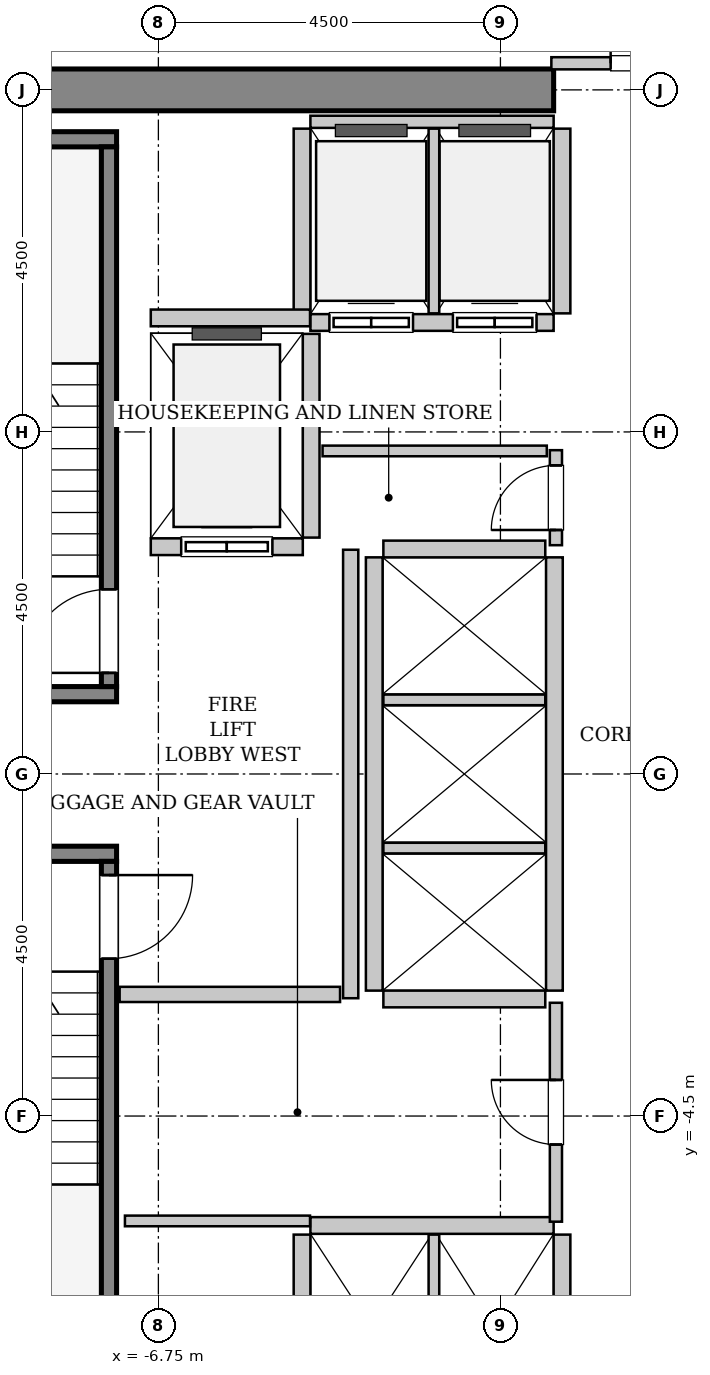
"""IFC4 building model, lengths in metres.
Left out: names, types, materials, properties, quantities, classifications, styles, units other than length and angle.
Written with IfcOpenShell. Run it as: python <this file> out.ifc"""

import sys

from ifc_helpers import new_model, si_unit, direction, frame, frame_2d, origin, place, context, subcontext, project, spatial, rectangle, extrude, source, transform, mapped, element, fill, save


model = new_model("IFC4")
c1 = context("Model", 3, precision=1e-05, world=origin(), true_north=direction((0.0, 1.0)))
c2 = subcontext(c1, "Body", "Model", "MODEL_VIEW")
j1 = project(units=[si_unit("LENGTHUNIT", "METRE"), si_unit("PLANEANGLEUNIT", "RADIAN")], contexts=[c1])
p1 = place(None, origin())
s1 = spatial("IfcSite", under=j1, at=p1, CompositionType="ELEMENT")
p2 = place(p1, origin())
s2 = spatial("IfcBuilding", under=s1, at=p2, CompositionType="ELEMENT")
p3 = place(p2, frame((0.0, 0.0, 98.4)))
s3 = spatial("IfcBuildingStorey", under=s2, at=p3, CompositionType="ELEMENT", Elevation=98.4)
m1 = source(origin(), c2, "Body", "SweptSolid", [
    extrude(rectangle(XDim=9.975, YDim=0.55, at=frame_2d((4.987, 0.0))), origin(), (0.0, 0.0, 1.0), 3.8),
])
p4 = place(p3, frame((-11.525, 9.0, 0.0), z_axis=(0.0, 0.0, 1.0), x_axis=(1.0, 0.0, 0.0)))
e1 = element("IfcWall", 1, at=p4, inside=s3, PredefinedType="SHEAR", context=c2, shape_type="MappedRepresentation", body=[
    mapped(m1, transform((0.0, 0.0, 0.0), x_axis=(1.0, 0.0, 0.0), y_axis=(0.0, 1.0, 0.0), z_axis=(0.0, 0.0, 1.0), scale=1.0)),
])
m2 = source(origin(), c2, "Body", "SweptSolid", [
    extrude(rectangle(XDim=3.4, YDim=0.2, at=frame_2d((1.7, 0.0))), origin(), (0.0, 0.0, 1.0), 3.8),
])
p5 = place(p3, frame((-7.3, 1.05, 0.0), z_axis=(0.0, 0.0, 1.0), x_axis=(-1.0, 0.0, 0.0)))
e2 = element("IfcWall", 2, at=p5, inside=s3, PredefinedType="SOLIDWALL", context=c2, shape_type="MappedRepresentation", body=[
    mapped(m2, transform((0.0, 0.0, 0.0), x_axis=(1.0, 0.0, 0.0), y_axis=(0.0, 1.0, 0.0), z_axis=(0.0, 0.0, 1.0), scale=1.0)),
])
m3 = source(origin(), c2, "Body", "SweptSolid", [
    extrude(rectangle(XDim=3.68, YDim=0.2, at=frame_2d((1.84, 0.0))), origin(), (0.0, 0.0, 1.0), 3.8),
])
p6 = place(p3, frame((-7.3, 8.35, 0.0), z_axis=(0.0, 0.0, 1.0), x_axis=(-1.0, 0.0, 0.0)))
e3 = element("IfcWall", 3, at=p6, inside=s3, PredefinedType="SOLIDWALL", context=c2, shape_type="MappedRepresentation", body=[
    mapped(m3, transform((0.0, 0.0, 0.0), x_axis=(1.0, 0.0, 0.0), y_axis=(0.0, 1.0, 0.0), z_axis=(0.0, 0.0, 1.0), scale=1.0)),
])
m4 = source(origin(), c2, "Body", "SweptSolid", [
    extrude(rectangle(XDim=7.1, YDim=0.2, at=frame_2d((3.55, 0.0))), origin(), (0.0, 0.0, 1.0), 3.8),
])
p7 = place(p3, frame((-7.4, 1.15, 0.0), z_axis=(0.0, 0.0, 1.0), x_axis=(0.0, 1.0, 0.0)))
e4 = element("IfcWall", 4, at=p7, inside=s3, PredefinedType="SOLIDWALL", context=c2, shape_type="MappedRepresentation", body=[
    mapped(m4, transform((0.0, 0.0, 0.0), x_axis=(1.0, 0.0, 0.0), y_axis=(0.0, 1.0, 0.0), z_axis=(0.0, 0.0, 1.0), scale=1.0)),
])
p8 = place(p7, frame((0.18, 0.0, 0.0)))
e5 = element("IfcOpeningElement", 5, at=p8, cuts=e4, PredefinedType="OPENING", context=c2, shape_type="SweptSolid", body=[
    extrude(rectangle(XDim=1.1, YDim=2.15, at=frame_2d((0.55, 1.075))), frame((0.0, 0.11, 0.0), z_axis=(0.0, -1.0, 0.0), x_axis=(1.0, 0.0, 0.0)), (0.0, 0.0, 1.0), 0.22),
])
p9 = place(p3, frame((-10.7, -1.05, 0.0), z_axis=(0.0, 0.0, 1.0), x_axis=(1.0, 0.0, 0.0)))
e6 = element("IfcWall", 6, at=p9, inside=s3, PredefinedType="SOLIDWALL", context=c2, shape_type="MappedRepresentation", body=[
    mapped(m2, transform((0.0, 0.0, 0.0), x_axis=(1.0, 0.0, 0.0), y_axis=(0.0, 1.0, 0.0), z_axis=(0.0, 0.0, 1.0), scale=1.0)),
])
p10 = place(p3, frame((-7.4, -1.15, 0.0), z_axis=(0.0, 0.0, 1.0), x_axis=(0.0, -1.0, 0.0)))
e7 = element("IfcWall", 7, at=p10, inside=s3, PredefinedType="SOLIDWALL", context=c2, shape_type="MappedRepresentation", body=[
    mapped(m4, transform((0.0, 0.0, 0.0), x_axis=(1.0, 0.0, 0.0), y_axis=(0.0, 1.0, 0.0), z_axis=(0.0, 0.0, 1.0), scale=1.0)),
])
p11 = place(p10, frame((0.18, 0.0, 0.0)))
e8 = element("IfcOpeningElement", 8, at=p11, cuts=e7, PredefinedType="OPENING", context=c2, shape_type="SweptSolid", body=[
    extrude(rectangle(XDim=1.1, YDim=2.15, at=frame_2d((0.55, 1.075))), frame((0.0, 0.11, 0.0), z_axis=(0.0, -1.0, 0.0), x_axis=(1.0, 0.0, 0.0)), (0.0, 0.0, 1.0), 0.22),
])
m5 = source(origin(), c2, "Body", "SweptSolid", [
    extrude(rectangle(XDim=2.0, YDim=0.22, at=frame_2d((1.0, 0.0))), origin(), (0.0, 0.0, 1.0), 3.535),
])
p12 = place(p3, frame((-6.85, 2.99, 0.0), z_axis=(0.0, 0.0, 1.0), x_axis=(1.0, 0.0, 0.0)))
e9 = element("IfcWall", 9, at=p12, inside=s3, PredefinedType="SOLIDWALL", context=c2, shape_type="MappedRepresentation", body=[
    mapped(m5, transform((0.0, 0.0, 0.0), x_axis=(1.0, 0.0, 0.0), y_axis=(0.0, 1.0, 0.0), z_axis=(0.0, 0.0, 1.0), scale=1.0)),
])
p13 = place(p12, frame((0.4, 0.0, 0.0)))
e10 = element("IfcOpeningElement", 10, at=p13, cuts=e9, PredefinedType="OPENING", context=c2, shape_type="SweptSolid", body=[
    extrude(rectangle(XDim=1.2, YDim=2.2, at=frame_2d((0.6, 1.1))), frame((0.0, 0.12, 0.0), z_axis=(0.0, -1.0, 0.0), x_axis=(1.0, 0.0, 0.0)), (0.0, 0.0, 1.0), 0.24),
])
m6 = source(origin(), c2, "Body", "SweptSolid", [
    extrude(rectangle(XDim=2.68, YDim=0.22, at=frame_2d((1.34, 0.0))), origin(), (0.0, 0.0, 1.0), 3.535),
])
p14 = place(p3, frame((-4.74, 3.11, 0.0), z_axis=(0.0, 0.0, 1.0), x_axis=(0.0, 1.0, 0.0)))
e11 = element("IfcWall", 11, at=p14, inside=s3, PredefinedType="SOLIDWALL", context=c2, shape_type="MappedRepresentation", body=[
    mapped(m6, transform((0.0, 0.0, 0.0), x_axis=(1.0, 0.0, 0.0), y_axis=(0.0, 1.0, 0.0), z_axis=(0.0, 0.0, 1.0), scale=1.0)),
])
m7 = source(origin(), c2, "Body", "SweptSolid", [
    extrude(rectangle(XDim=3.2, YDim=0.22, at=frame_2d((1.6, 0.0))), origin(), (0.0, 0.0, 1.0), 3.535),
])
p15 = place(p3, frame((-4.75, 5.94, 0.0), z_axis=(0.0, 0.0, 1.0), x_axis=(1.0, 0.0, 0.0)))
e12 = element("IfcWall", 12, at=p15, inside=s3, PredefinedType="SOLIDWALL", context=c2, shape_type="MappedRepresentation", body=[
    mapped(m7, transform((0.0, 0.0, 0.0), x_axis=(1.0, 0.0, 0.0), y_axis=(0.0, 1.0, 0.0), z_axis=(0.0, 0.0, 1.0), scale=1.0)),
])
p16 = place(p15, frame((0.25, 0.0, 0.0)))
e13 = element("IfcOpeningElement", 13, at=p16, cuts=e12, PredefinedType="OPENING", context=c2, shape_type="SweptSolid", body=[
    extrude(rectangle(XDim=1.1, YDim=2.2, at=frame_2d((0.55, 1.1))), frame((0.0, 0.12, 0.0), z_axis=(0.0, -1.0, 0.0), x_axis=(1.0, 0.0, 0.0)), (0.0, 0.0, 1.0), 0.24),
])
p17 = place(p15, frame((1.875, 0.0, 0.0)))
e14 = element("IfcOpeningElement", 14, at=p17, cuts=e12, PredefinedType="OPENING", context=c2, shape_type="SweptSolid", body=[
    extrude(rectangle(XDim=1.1, YDim=2.2, at=frame_2d((0.55, 1.1))), frame((0.0, 0.12, 0.0), z_axis=(0.0, -1.0, 0.0), x_axis=(1.0, 0.0, 0.0)), (0.0, 0.0, 1.0), 0.24),
])
m8 = source(origin(), c2, "Body", "SweptSolid", [
    extrude(rectangle(XDim=3.2, YDim=0.16, at=frame_2d((1.6, 0.0))), origin(), (0.0, 0.0, 1.0), 2.425),
])
p18 = place(p3, frame((-1.55, 8.58, 0.0), z_axis=(0.0, 0.0, 1.0), x_axis=(-1.0, 0.0, 0.0)))
e15 = element("IfcWall", 15, at=p18, inside=s3, PredefinedType="PARTITIONING", context=c2, shape_type="MappedRepresentation", body=[
    mapped(m8, transform((0.0, 0.0, 0.0), x_axis=(1.0, 0.0, 0.0), y_axis=(0.0, 1.0, 0.0), z_axis=(0.0, 0.0, 1.0), scale=1.0)),
])
m9 = source(origin(), c2, "Body", "SweptSolid", [
    extrude(rectangle(XDim=2.43, YDim=0.22, at=frame_2d((1.215, 0.0))), origin(), (0.0, 0.0, 1.0), 3.535),
])
p19 = place(p3, frame((-4.86, 8.49, 0.0), z_axis=(0.0, 0.0, 1.0), x_axis=(0.0, -1.0, 0.0)))
e16 = element("IfcWall", 16, at=p19, inside=s3, PredefinedType="SOLIDWALL", context=c2, shape_type="MappedRepresentation", body=[
    mapped(m9, transform((0.0, 0.0, 0.0), x_axis=(1.0, 0.0, 0.0), y_axis=(0.0, 1.0, 0.0), z_axis=(0.0, 0.0, 1.0), scale=1.0)),
])
m10 = source(origin(), c2, "Body", "SweptSolid", [
    extrude(rectangle(XDim=2.43, YDim=0.14, at=frame_2d((1.215, 0.0))), origin(), (0.0, 0.0, 1.0), 3.535),
])
p20 = place(p3, frame((-3.125, 6.06, 0.0), z_axis=(0.0, 0.0, 1.0), x_axis=(0.0, 1.0, 0.0)))
e17 = element("IfcWall", 17, at=p20, inside=s3, PredefinedType="PARTITIONING", context=c2, shape_type="MappedRepresentation", body=[
    mapped(m10, transform((0.0, 0.0, 0.0), x_axis=(1.0, 0.0, 0.0), y_axis=(0.0, 1.0, 0.0), z_axis=(0.0, 0.0, 1.0), scale=1.0)),
])
p21 = place(p3, frame((-1.44, 6.06, 0.0), z_axis=(0.0, 0.0, 1.0), x_axis=(0.0, 1.0, 0.0)))
e18 = element("IfcWall", 18, at=p21, inside=s3, PredefinedType="SOLIDWALL", context=c2, shape_type="MappedRepresentation", body=[
    mapped(m9, transform((0.0, 0.0, 0.0), x_axis=(1.0, 0.0, 0.0), y_axis=(0.0, 1.0, 0.0), z_axis=(0.0, 0.0, 1.0), scale=1.0)),
])
p22 = place(p3, frame((-1.55, -5.94, 0.0), z_axis=(0.0, 0.0, 1.0), x_axis=(-1.0, 0.0, 0.0)))
e19 = element("IfcWall", 19, at=p22, inside=s3, PredefinedType="SOLIDWALL", context=c2, shape_type="MappedRepresentation", body=[
    mapped(m7, transform((0.0, 0.0, 0.0), x_axis=(1.0, 0.0, 0.0), y_axis=(0.0, 1.0, 0.0), z_axis=(0.0, 0.0, 1.0), scale=1.0)),
])
p23 = place(p3, frame((-4.86, -6.06, 0.0), z_axis=(0.0, 0.0, 1.0), x_axis=(0.0, -1.0, 0.0)))
e20 = element("IfcWall", 20, at=p23, inside=s3, PredefinedType="SOLIDWALL", context=c2, shape_type="MappedRepresentation", body=[
    mapped(m9, transform((0.0, 0.0, 0.0), x_axis=(1.0, 0.0, 0.0), y_axis=(0.0, 1.0, 0.0), z_axis=(0.0, 0.0, 1.0), scale=1.0)),
])
p24 = place(p3, frame((-3.125, -8.49, 0.0), z_axis=(0.0, 0.0, 1.0), x_axis=(0.0, 1.0, 0.0)))
e21 = element("IfcWall", 21, at=p24, inside=s3, PredefinedType="PARTITIONING", context=c2, shape_type="MappedRepresentation", body=[
    mapped(m10, transform((0.0, 0.0, 0.0), x_axis=(1.0, 0.0, 0.0), y_axis=(0.0, 1.0, 0.0), z_axis=(0.0, 0.0, 1.0), scale=1.0)),
])
p25 = place(p3, frame((-1.44, -8.49, 0.0), z_axis=(0.0, 0.0, 1.0), x_axis=(0.0, 1.0, 0.0)))
e22 = element("IfcWall", 22, at=p25, inside=s3, PredefinedType="SOLIDWALL", context=c2, shape_type="MappedRepresentation", body=[
    mapped(m9, transform((0.0, 0.0, 0.0), x_axis=(1.0, 0.0, 0.0), y_axis=(0.0, 1.0, 0.0), z_axis=(0.0, 0.0, 1.0), scale=1.0)),
])
m11 = source(origin(), c2, "Body", "SweptSolid", [
    extrude(rectangle(XDim=5.7, YDim=0.22, at=frame_2d((2.85, 0.0))), origin(), (0.0, 0.0, 1.0), 3.535),
])
for number, where, z_axis, x_axis in (
    (23, (-1.54, -2.85, 0.0), (0.0, 0.0, 1.0), (0.0, 1.0, 0.0)),
    (24, (-3.91, 2.85, 0.0), (0.0, 0.0, 1.0), (0.0, -1.0, 0.0)),
):
    element("IfcWall", number, at=place(p3, frame(where, z_axis=z_axis, x_axis=x_axis)), inside=s3, PredefinedType="SOLIDWALL", context=c2, shape_type="MappedRepresentation", body=[
        mapped(m11, transform((0.0, 0.0, 0.0), x_axis=(1.0, 0.0, 0.0), y_axis=(0.0, 1.0, 0.0), z_axis=(0.0, 0.0, 1.0), scale=1.0)),
    ])
m12 = source(origin(), c2, "Body", "SweptSolid", [
    extrude(rectangle(XDim=2.13, YDim=0.22, at=frame_2d((1.065, 0.0))), origin(), (0.0, 0.0, 1.0), 3.535),
])
p26 = place(p3, frame((-3.79, -2.96, 0.0), z_axis=(0.0, 0.0, 1.0), x_axis=(1.0, 0.0, 0.0)))
e25 = element("IfcWall", 25, at=p26, inside=s3, PredefinedType="SOLIDWALL", context=c2, shape_type="MappedRepresentation", body=[
    mapped(m12, transform((0.0, 0.0, 0.0), x_axis=(1.0, 0.0, 0.0), y_axis=(0.0, 1.0, 0.0), z_axis=(0.0, 0.0, 1.0), scale=1.0)),
])
m13 = source(origin(), c2, "Body", "SweptSolid", [
    extrude(rectangle(XDim=2.13, YDim=0.14, at=frame_2d((1.065, 0.0))), origin(), (0.0, 0.0, 1.0), 3.535),
])
for number, where, z_axis, x_axis in (
    (26, (-3.79, -0.975, 0.0), (0.0, 0.0, 1.0), (1.0, 0.0, 0.0)),
    (27, (-3.79, 0.975, 0.0), (0.0, 0.0, 1.0), (1.0, 0.0, 0.0)),
):
    element("IfcWall", number, at=place(p3, frame(where, z_axis=z_axis, x_axis=x_axis)), inside=s3, PredefinedType="PARTITIONING", context=c2, shape_type="MappedRepresentation", body=[
        mapped(m13, transform((0.0, 0.0, 0.0), x_axis=(1.0, 0.0, 0.0), y_axis=(0.0, 1.0, 0.0), z_axis=(0.0, 0.0, 1.0), scale=1.0)),
    ])
p27 = place(p3, frame((-1.66, 2.96, 0.0), z_axis=(0.0, 0.0, 1.0), x_axis=(-1.0, 0.0, 0.0)))
e28 = element("IfcWall", 28, at=p27, inside=s3, PredefinedType="SOLIDWALL", context=c2, shape_type="MappedRepresentation", body=[
    mapped(m12, transform((0.0, 0.0, 0.0), x_axis=(1.0, 0.0, 0.0), y_axis=(0.0, 1.0, 0.0), z_axis=(0.0, 0.0, 1.0), scale=1.0)),
])
m14 = source(origin(), c2, "Body", "SweptSolid", [
    extrude(rectangle(XDim=2.095, YDim=0.22, at=frame_2d((1.048, 0.0))), origin(), (0.0, 0.0, 1.0), 3.535),
])
p28 = place(p3, frame((-6.85, 6.0, 0.0), z_axis=(0.0, 0.0, 1.0), x_axis=(1.0, 0.0, 0.0)))
e29 = element("IfcWall", 29, at=p28, inside=s3, PredefinedType="SOLIDWALL", context=c2, shape_type="MappedRepresentation", body=[
    mapped(m14, transform((0.0, 0.0, 0.0), x_axis=(1.0, 0.0, 0.0), y_axis=(0.0, 1.0, 0.0), z_axis=(0.0, 0.0, 1.0), scale=1.0)),
])
m15 = source(origin(), c2, "Body", "SweptSolid", [
    extrude(rectangle(XDim=5.9, YDim=0.2, at=frame_2d((2.95, 0.0))), origin(), (0.0, 0.0, 1.0), 3.535),
])
p29 = place(p3, frame((-4.22, -2.95, 0.0), z_axis=(0.0, 0.0, 1.0), x_axis=(0.0, 1.0, 0.0)))
e30 = element("IfcWall", 30, at=p29, inside=s3, PredefinedType="PARTITIONING", context=c2, shape_type="MappedRepresentation", body=[
    mapped(m15, transform((0.0, 0.0, 0.0), x_axis=(1.0, 0.0, 0.0), y_axis=(0.0, 1.0, 0.0), z_axis=(0.0, 0.0, 1.0), scale=1.0)),
])
m16 = source(origin(), c2, "Body", "SweptSolid", [
    extrude(rectangle(XDim=2.9, YDim=0.2, at=frame_2d((1.45, 0.0))), origin(), (0.0, 0.0, 1.0), 3.535),
])
p30 = place(p3, frame((-7.26, -2.9, 0.0), z_axis=(0.0, 0.0, 1.0), x_axis=(1.0, 0.0, 0.0)))
e31 = element("IfcWall", 31, at=p30, inside=s3, PredefinedType="PARTITIONING", context=c2, shape_type="MappedRepresentation", body=[
    mapped(m16, transform((0.0, 0.0, 0.0), x_axis=(1.0, 0.0, 0.0), y_axis=(0.0, 1.0, 0.0), z_axis=(0.0, 0.0, 1.0), scale=1.0)),
])
m17 = source(origin(), c2, "Body", "SweptSolid", [
    extrude(rectangle(XDim=3.16, YDim=0.16, at=frame_2d((1.58, 0.0))), origin(), (0.0, 0.0, 1.0), 2.425),
])
p31 = place(p3, frame((-1.58, 9.35, 0.0), z_axis=(0.0, 0.0, 1.0), x_axis=(1.0, 0.0, 0.0)))
e32 = element("IfcWall", 32, at=p31, inside=s3, PredefinedType="PARTITIONING", context=c2, shape_type="MappedRepresentation", body=[
    mapped(m17, transform((0.0, 0.0, 0.0), x_axis=(1.0, 0.0, 0.0), y_axis=(0.0, 1.0, 0.0), z_axis=(0.0, 0.0, 1.0), scale=1.0)),
])
p32 = place(p31, frame((0.78, 0.0, 0.0)))
e33 = element("IfcOpeningElement", 33, at=p32, cuts=e32, PredefinedType="OPENING", context=c2, shape_type="SweptSolid", body=[
    extrude(rectangle(XDim=1.6, YDim=2.3, at=frame_2d((0.8, 1.15))), frame((0.0, 0.09, 0.0), z_axis=(0.0, -1.0, 0.0), x_axis=(1.0, 0.0, 0.0)), (0.0, 0.0, 1.0), 0.18),
])
m18 = source(origin(), c2, "Body", "SweptSolid", [
    extrude(rectangle(XDim=1.25, YDim=0.16, at=frame_2d((0.625, 0.0))), origin(), (0.0, 0.0, 1.0), 3.535),
])
p33 = place(p3, frame((-1.52, 3.01, 0.0), z_axis=(0.0, 0.0, 1.0), x_axis=(0.0, 1.0, 0.0)))
e34 = element("IfcWall", 34, at=p33, inside=s3, PredefinedType="PARTITIONING", context=c2, shape_type="MappedRepresentation", body=[
    mapped(m18, transform((0.0, 0.0, 0.0), x_axis=(1.0, 0.0, 0.0), y_axis=(0.0, 1.0, 0.0), z_axis=(0.0, 0.0, 1.0), scale=1.0)),
])
p34 = place(p33, frame((0.2, 0.0, 0.0)))
e35 = element("IfcOpeningElement", 35, at=p34, cuts=e34, PredefinedType="OPENING", context=c2, shape_type="SweptSolid", body=[
    extrude(rectangle(XDim=0.85, YDim=2.1, at=frame_2d((0.425, 1.05))), frame((0.0, 0.09, 0.0), z_axis=(0.0, -1.0, 0.0), x_axis=(1.0, 0.0, 0.0)), (0.0, 0.0, 1.0), 0.18),
])
m19 = source(origin(), c2, "Body", "SweptSolid", [
    extrude(rectangle(XDim=2.95, YDim=0.14, at=frame_2d((1.475, 0.0))), origin(), (0.0, 0.0, 1.0), 3.535),
])
p35 = place(p3, frame((-4.59, 4.25, 0.0), z_axis=(0.0, 0.0, 1.0), x_axis=(1.0, 0.0, 0.0)))
e36 = element("IfcWall", 36, at=p35, inside=s3, PredefinedType="PARTITIONING", context=c2, shape_type="MappedRepresentation", body=[
    mapped(m19, transform((0.0, 0.0, 0.0), x_axis=(1.0, 0.0, 0.0), y_axis=(0.0, 1.0, 0.0), z_axis=(0.0, 0.0, 1.0), scale=1.0)),
])
m20 = source(origin(), c2, "Body", "SweptSolid", [
    extrude(rectangle(XDim=2.88, YDim=0.16, at=frame_2d((1.44, 0.0))), origin(), (0.0, 0.0, 1.0), 3.535),
])
p36 = place(p3, frame((-1.52, -5.89, 0.0), z_axis=(0.0, 0.0, 1.0), x_axis=(0.0, 1.0, 0.0)))
e37 = element("IfcWall", 37, at=p36, inside=s3, PredefinedType="PARTITIONING", context=c2, shape_type="MappedRepresentation", body=[
    mapped(m20, transform((0.0, 0.0, 0.0), x_axis=(1.0, 0.0, 0.0), y_axis=(0.0, 1.0, 0.0), z_axis=(0.0, 0.0, 1.0), scale=1.0)),
])
p37 = place(p36, frame((1.015, 0.0, 0.0)))
e38 = element("IfcOpeningElement", 38, at=p37, cuts=e37, PredefinedType="OPENING", context=c2, shape_type="SweptSolid", body=[
    extrude(rectangle(XDim=0.85, YDim=2.1, at=frame_2d((0.425, 1.05))), frame((0.0, 0.09, 0.0), z_axis=(0.0, -1.0, 0.0), x_axis=(1.0, 0.0, 0.0)), (0.0, 0.0, 1.0), 0.18),
])
m21 = source(origin(), c2, "Body", "SweptSolid", [
    extrude(rectangle(XDim=2.435, YDim=0.14, at=frame_2d((1.218, 0.0))), origin(), (0.0, 0.0, 1.0), 3.535),
])
p38 = place(p3, frame((-7.19, -5.88, 0.0), z_axis=(0.0, 0.0, 1.0), x_axis=(1.0, 0.0, 0.0)))
e39 = element("IfcWall", 39, at=p38, inside=s3, PredefinedType="PARTITIONING", context=c2, shape_type="MappedRepresentation", body=[
    mapped(m21, transform((0.0, 0.0, 0.0), x_axis=(1.0, 0.0, 0.0), y_axis=(0.0, 1.0, 0.0), z_axis=(0.0, 0.0, 1.0), scale=1.0)),
])
m22 = source(origin(), c2, "Body", "SweptSolid", [
    extrude(rectangle(XDim=1.1, YDim=2.15, at=frame_2d((0.55, 1.075))), frame((0.0, 0.025, 0.0), z_axis=(0.0, -1.0, 0.0), x_axis=(1.0, 0.0, 0.0)), (0.0, 0.0, 1.0), 0.05),
])
p39 = place(p8, origin())
e40 = element("IfcDoor", 40, at=p39, inside=s3, OperationType="SINGLE_SWING_LEFT", PredefinedType="DOOR", context=c2, shape_type="MappedRepresentation", body=[
    mapped(m22, transform((0.0, 0.0, 0.0), x_axis=(1.0, 0.0, 0.0), y_axis=(0.0, 1.0, 0.0), z_axis=(0.0, 0.0, 1.0), scale=1.0)),
])
fill(e5, e40)
p40 = place(p11, origin())
e41 = element("IfcDoor", 41, at=p40, inside=s3, OperationType="SINGLE_SWING_LEFT", PredefinedType="DOOR", context=c2, shape_type="MappedRepresentation", body=[
    mapped(m22, transform((0.0, 0.0, 0.0), x_axis=(1.0, 0.0, 0.0), y_axis=(0.0, 1.0, 0.0), z_axis=(0.0, 0.0, 1.0), scale=1.0)),
])
fill(e8, e41)
m23 = source(origin(), c2, "Body", "SweptSolid", [
    extrude(rectangle(XDim=1.2, YDim=2.2, at=frame_2d((0.6, 1.1))), frame((0.0, 0.025, 0.0), z_axis=(0.0, -1.0, 0.0), x_axis=(1.0, 0.0, 0.0)), (0.0, 0.0, 1.0), 0.05),
])
p41 = place(p13, origin())
e42 = element("IfcDoor", 42, at=p41, inside=s3, OperationType="SLIDING_TO_LEFT", PredefinedType="DOOR", context=c2, shape_type="MappedRepresentation", body=[
    mapped(m23, transform((0.0, 0.0, 0.0), x_axis=(1.0, 0.0, 0.0), y_axis=(0.0, 1.0, 0.0), z_axis=(0.0, 0.0, 1.0), scale=1.0)),
])
fill(e10, e42)
m24 = source(origin(), c2, "Body", "SweptSolid", [
    extrude(rectangle(XDim=1.1, YDim=2.2, at=frame_2d((0.55, 1.1))), frame((0.0, 0.025, 0.0), z_axis=(0.0, -1.0, 0.0), x_axis=(1.0, 0.0, 0.0)), (0.0, 0.0, 1.0), 0.05),
])
p42 = place(p16, origin())
e43 = element("IfcDoor", 43, at=p42, inside=s3, OperationType="DOUBLE_DOOR_SLIDING", PredefinedType="DOOR", context=c2, shape_type="MappedRepresentation", body=[
    mapped(m24, transform((0.0, 0.0, 0.0), x_axis=(1.0, 0.0, 0.0), y_axis=(0.0, 1.0, 0.0), z_axis=(0.0, 0.0, 1.0), scale=1.0)),
])
fill(e13, e43)
p43 = place(p17, origin())
e44 = element("IfcDoor", 44, at=p43, inside=s3, OperationType="DOUBLE_DOOR_SLIDING", PredefinedType="DOOR", context=c2, shape_type="MappedRepresentation", body=[
    mapped(m24, transform((0.0, 0.0, 0.0), x_axis=(1.0, 0.0, 0.0), y_axis=(0.0, 1.0, 0.0), z_axis=(0.0, 0.0, 1.0), scale=1.0)),
])
fill(e14, e44)
m25 = source(origin(), c2, "Body", "SweptSolid", [
    extrude(rectangle(XDim=1.6, YDim=2.3, at=frame_2d((0.8, 1.15))), frame((0.0, 0.025, 0.0), z_axis=(0.0, -1.0, 0.0), x_axis=(1.0, 0.0, 0.0)), (0.0, 0.0, 1.0), 0.05),
])
p44 = place(p32, origin())
e45 = element("IfcDoor", 45, at=p44, inside=s3, OperationType="DOUBLE_DOOR_SINGLE_SWING", PredefinedType="DOOR", context=c2, shape_type="MappedRepresentation", body=[
    mapped(m25, transform((0.0, 0.0, 0.0), x_axis=(1.0, 0.0, 0.0), y_axis=(0.0, 1.0, 0.0), z_axis=(0.0, 0.0, 1.0), scale=1.0)),
])
fill(e33, e45)
m26 = source(origin(), c2, "Body", "SweptSolid", [
    extrude(rectangle(XDim=0.85, YDim=2.1, at=frame_2d((0.425, 1.05))), frame((0.0, 0.025, 0.0), z_axis=(0.0, -1.0, 0.0), x_axis=(1.0, 0.0, 0.0)), (0.0, 0.0, 1.0), 0.05),
])
p45 = place(p34, origin())
e46 = element("IfcDoor", 46, at=p45, inside=s3, OperationType="SINGLE_SWING_LEFT", PredefinedType="DOOR", context=c2, shape_type="MappedRepresentation", body=[
    mapped(m26, transform((0.0, 0.0, 0.0), x_axis=(1.0, 0.0, 0.0), y_axis=(0.0, 1.0, 0.0), z_axis=(0.0, 0.0, 1.0), scale=1.0)),
])
fill(e35, e46)
p46 = place(p37, origin())
e47 = element("IfcDoor", 47, at=p46, inside=s3, OperationType="SINGLE_SWING_RIGHT", PredefinedType="DOOR", context=c2, shape_type="MappedRepresentation", body=[
    mapped(m26, transform((0.0, 0.0, 0.0), x_axis=(1.0, 0.0, 0.0), y_axis=(0.0, 1.0, 0.0), z_axis=(0.0, 0.0, 1.0), scale=1.0)),
])
fill(e38, e47)
save(model, sys.argv[1])
